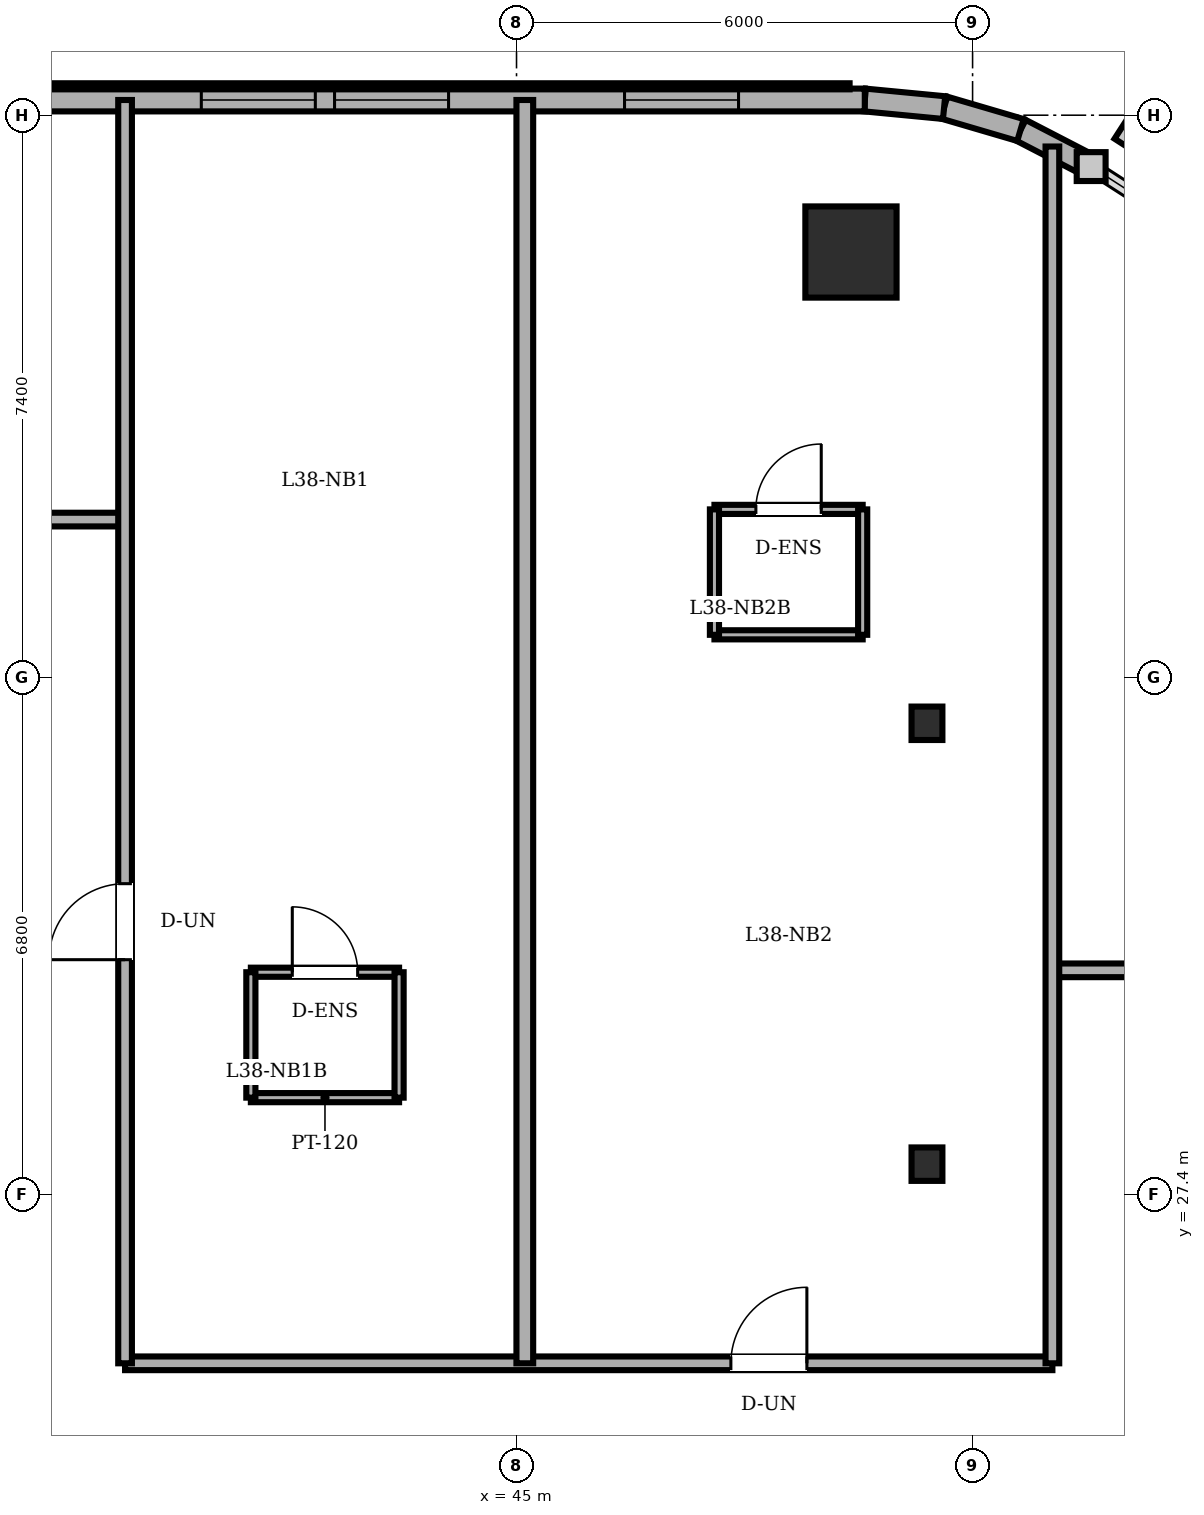
"""IFC4 building model, lengths in metres.
Left out: names, types, materials, properties, quantities, classifications, styles, units other than length and angle.
Written with IfcOpenShell. Run it as: python <this file> out.ifc"""

import sys

from ifc_helpers import new_model, si_unit, direction, frame, frame_2d, origin, origin_2d, place, context, subcontext, project, spatial, rectangle, circle, i_section, extrude, element, fill, save


model = new_model("IFC4")
c1 = context("Model", 3, precision=1e-05, world=origin(), true_north=direction((0.0, 1.0)))
c2 = subcontext(c1, "Body", "Model", "MODEL_VIEW")
j1 = project(units=[si_unit("LENGTHUNIT", "METRE"), si_unit("PLANEANGLEUNIT", "RADIAN")], contexts=[c1])
p1 = place(None, origin())
s1 = spatial("IfcSite", under=j1, at=p1, CompositionType="ELEMENT")
p2 = place(p1, origin())
s2 = spatial("IfcBuilding", under=s1, at=p2, CompositionType="ELEMENT")
p3 = place(p2, frame((0.0, 0.0, 147.4)))
s3 = spatial("IfcBuildingStorey", under=s2, at=p3, CompositionType="ELEMENT", Elevation=147.4)
p4 = place(p3, frame((49.4, 39.8, 0.0), z_axis=(0.0, 0.0, 1.0), x_axis=(1.0, 0.0, 0.0)))
e1 = element("IfcColumn", 1, at=p4, inside=s3, PredefinedType="COLUMN", context=c2, shape_type="SweptSolid", body=[
    extrude(circle(Radius=0.6, at=origin_2d()), origin(), (0.0, 0.0, 1.0), 3.6),
])
for number, where, z_axis, x_axis in (
    (2, (50.4, 27.8, 0.0), (0.0, 0.0, 1.0), (1.0, 0.0, 0.0)),
    (3, (50.4, 33.6, 0.0), (0.0, 0.0, 1.0), (1.0, 0.0, 0.0)),
):
    element("IfcColumn", number, at=place(p3, frame(where, z_axis=z_axis, x_axis=x_axis)), inside=s3, PredefinedType="COLUMN", context=c2, shape_type="SweptSolid", body=[
        extrude(i_section(OverallWidth=0.406, OverallDepth=0.44, WebThickness=0.024, FlangeThickness=0.039, FilletRadius=0.015, at=origin_2d()), origin(), (0.0, 0.0, 1.0), 3.6),
    ])
p5 = place(p3, frame((52.56, 40.924, 0.0), z_axis=(0.0, 0.0, 1.0), x_axis=(-0.888283247196, 0.459296062198, 0.0)))
e4 = element("IfcWall", 4, at=p5, inside=s3, PredefinedType="SOLIDWALL", context=c2, shape_type="SweptSolid", body=[
    extrude(rectangle(XDim=1.047, YDim=0.3, at=frame_2d((0.523, 0.0))), origin(), (0.0, 0.0, 1.0), 3.4),
])
p6 = place(p3, frame((51.63, 41.405, 0.0), z_axis=(0.0, 0.0, 1.0), x_axis=(-0.959528674476, 0.281610942363, 0.0)))
e5 = element("IfcWall", 5, at=p6, inside=s3, PredefinedType="SOLIDWALL", context=c2, shape_type="SweptSolid", body=[
    extrude(rectangle(XDim=1.047, YDim=0.3, at=frame_2d((0.524, 0.0))), origin(), (0.0, 0.0, 1.0), 3.4),
])
p7 = place(p3, frame((50.625, 41.7, 0.0), z_axis=(0.0, 0.0, 1.0), x_axis=(-0.995426089968, 0.095534807324, 0.0)))
e6 = element("IfcWall", 6, at=p7, inside=s3, PredefinedType="SOLIDWALL", context=c2, shape_type="SweptSolid", body=[
    extrude(rectangle(XDim=1.048, YDim=0.3, at=frame_2d((0.524, 0.0))), origin(), (0.0, 0.0, 1.0), 3.4),
])
p8 = place(p3, frame((49.582, 41.8, 0.0), z_axis=(0.0, 0.0, 1.0), x_axis=(-1.0, 0.0, 0.0)))
e7 = element("IfcWall", 7, at=p8, inside=s3, PredefinedType="SOLIDWALL", context=c2, shape_type="SweptSolid", body=[
    extrude(rectangle(XDim=30.282, YDim=0.3, at=frame_2d((15.141, 0.0))), origin(), (0.0, 0.0, 1.0), 3.4),
])
p9 = place(p8, frame((25.707, 0.0, 0.0)))
e8 = element("IfcOpeningElement", 8, at=p9, cuts=e7, PredefinedType="OPENING", context=c2, shape_type="SweptSolid", body=[
    extrude(rectangle(XDim=0.95, YDim=2.2, at=frame_2d((0.475, 1.1))), frame((0.0, 0.16, 0.0), z_axis=(0.0, -1.0, 0.0), x_axis=(1.0, 0.0, 0.0)), (0.0, 0.0, 1.0), 0.32),
])
p10 = place(p8, frame((1.661, 0.0, 0.85)))
e9 = element("IfcOpeningElement", 9, at=p10, cuts=e7, PredefinedType="OPENING", context=c2, shape_type="SweptSolid", body=[
    extrude(rectangle(XDim=1.5, YDim=1.55, at=frame_2d((0.75, 0.775))), frame((0.0, 0.16, 0.0), z_axis=(0.0, -1.0, 0.0), x_axis=(1.0, 0.0, 0.0)), (0.0, 0.0, 1.0), 0.32),
])
p11 = place(p8, frame((5.476, 0.0, 0.85)))
e10 = element("IfcOpeningElement", 10, at=p11, cuts=e7, PredefinedType="OPENING", context=c2, shape_type="SweptSolid", body=[
    extrude(rectangle(XDim=1.5, YDim=1.55, at=frame_2d((0.75, 0.775))), frame((0.0, 0.16, 0.0), z_axis=(0.0, -1.0, 0.0), x_axis=(1.0, 0.0, 0.0)), (0.0, 0.0, 1.0), 0.32),
])
p12 = place(p8, frame((7.229, 0.0, 0.85)))
e11 = element("IfcOpeningElement", 11, at=p12, cuts=e7, PredefinedType="OPENING", context=c2, shape_type="SweptSolid", body=[
    extrude(rectangle(XDim=1.5, YDim=1.55, at=frame_2d((0.75, 0.775))), frame((0.0, 0.16, 0.0), z_axis=(0.0, -1.0, 0.0), x_axis=(1.0, 0.0, 0.0)), (0.0, 0.0, 1.0), 0.32),
])
p13 = place(p8, frame((11.665, 0.0, 0.85)))
e12 = element("IfcOpeningElement", 12, at=p13, cuts=e7, PredefinedType="OPENING", context=c2, shape_type="SweptSolid", body=[
    extrude(rectangle(XDim=1.5, YDim=1.55, at=frame_2d((0.75, 0.775))), frame((0.0, 0.16, 0.0), z_axis=(0.0, -1.0, 0.0), x_axis=(1.0, 0.0, 0.0)), (0.0, 0.0, 1.0), 0.32),
])
p14 = place(p8, frame((14.349, 0.0, 0.85)))
e13 = element("IfcOpeningElement", 13, at=p14, cuts=e7, PredefinedType="OPENING", context=c2, shape_type="SweptSolid", body=[
    extrude(rectangle(XDim=1.5, YDim=1.55, at=frame_2d((0.75, 0.775))), frame((0.0, 0.16, 0.0), z_axis=(0.0, -1.0, 0.0), x_axis=(1.0, 0.0, 0.0)), (0.0, 0.0, 1.0), 0.32),
])
p15 = place(p8, frame((18.932, 0.0, 0.85)))
e14 = element("IfcOpeningElement", 14, at=p15, cuts=e7, PredefinedType="OPENING", context=c2, shape_type="SweptSolid", body=[
    extrude(rectangle(XDim=1.5, YDim=1.55, at=frame_2d((0.75, 0.775))), frame((0.0, 0.16, 0.0), z_axis=(0.0, -1.0, 0.0), x_axis=(1.0, 0.0, 0.0)), (0.0, 0.0, 1.0), 0.32),
])
p16 = place(p8, frame((22.532, 0.0, 0.85)))
e15 = element("IfcOpeningElement", 15, at=p16, cuts=e7, PredefinedType="OPENING", context=c2, shape_type="SweptSolid", body=[
    extrude(rectangle(XDim=1.5, YDim=1.55, at=frame_2d((0.75, 0.775))), frame((0.0, 0.16, 0.0), z_axis=(0.0, -1.0, 0.0), x_axis=(1.0, 0.0, 0.0)), (0.0, 0.0, 1.0), 0.32),
])
p17 = place(p8, frame((27.532, 0.0, 0.85)))
e16 = element("IfcOpeningElement", 16, at=p17, cuts=e7, PredefinedType="OPENING", context=c2, shape_type="SweptSolid", body=[
    extrude(rectangle(XDim=1.5, YDim=1.55, at=frame_2d((0.75, 0.775))), frame((0.0, 0.16, 0.0), z_axis=(0.0, -1.0, 0.0), x_axis=(1.0, 0.0, 0.0)), (0.0, 0.0, 1.0), 0.32),
])
p18 = place(p3, frame((41.505, 30.325, 0.0), z_axis=(0.0, 0.0, 1.0), x_axis=(1.0, 0.0, 0.0)))
e17 = element("IfcWall", 17, at=p18, inside=s3, PredefinedType="PARTITIONING", context=c2, shape_type="SweptSolid", body=[
    extrude(rectangle(XDim=1.95, YDim=0.12, at=frame_2d((0.975, 0.0))), origin(), (0.0, 0.0, 1.0), 3.4),
])
p19 = place(p18, frame((0.545, 0.0, 0.0)))
e18 = element("IfcOpeningElement", 18, at=p19, cuts=e17, PredefinedType="OPENING", context=c2, shape_type="SweptSolid", body=[
    extrude(rectangle(XDim=0.86, YDim=2.1, at=frame_2d((0.43, 1.05))), frame((0.0, 0.07, 0.0), z_axis=(0.0, -1.0, 0.0), x_axis=(1.0, 0.0, 0.0)), (0.0, 0.0, 1.0), 0.14),
])
p20 = place(p3, frame((43.455, 28.675, 0.0), z_axis=(0.0, 0.0, 1.0), x_axis=(-1.0, 0.0, 0.0)))
e19 = element("IfcWall", 19, at=p20, inside=s3, PredefinedType="PARTITIONING", context=c2, shape_type="SweptSolid", body=[
    extrude(rectangle(XDim=1.95, YDim=0.12, at=frame_2d((0.975, 0.0))), origin(), (0.0, 0.0, 1.0), 3.4),
])
for number, where, z_axis, x_axis in (
    (20, (41.505, 30.325, 0.0), (0.0, 0.0, 1.0), (0.0, -1.0, 0.0)),
    (21, (43.455, 28.675, 0.0), (0.0, 0.0, 1.0), (0.0, 1.0, 0.0)),
):
    element("IfcWall", number, at=place(p3, frame(where, z_axis=z_axis, x_axis=x_axis)), inside=s3, PredefinedType="PARTITIONING", context=c2, shape_type="SweptSolid", body=[
        extrude(rectangle(XDim=1.65, YDim=0.12, at=frame_2d((0.825, 0.0))), origin(), (0.0, 0.0, 1.0), 3.4),
    ])
p21 = place(p3, frame((47.604, 36.414, 0.0), z_axis=(0.0, 0.0, 1.0), x_axis=(1.0, 0.0, 0.0)))
e22 = element("IfcWall", 22, at=p21, inside=s3, PredefinedType="PARTITIONING", context=c2, shape_type="SweptSolid", body=[
    extrude(rectangle(XDim=1.95, YDim=0.12, at=frame_2d((0.975, 0.0))), origin(), (0.0, 0.0, 1.0), 3.4),
])
p22 = place(p21, frame((0.545, 0.0, 0.0)))
e23 = element("IfcOpeningElement", 23, at=p22, cuts=e22, PredefinedType="OPENING", context=c2, shape_type="SweptSolid", body=[
    extrude(rectangle(XDim=0.86, YDim=2.1, at=frame_2d((0.43, 1.05))), frame((0.0, 0.07, 0.0), z_axis=(0.0, -1.0, 0.0), x_axis=(1.0, 0.0, 0.0)), (0.0, 0.0, 1.0), 0.14),
])
p23 = place(p3, frame((49.554, 34.764, 0.0), z_axis=(0.0, 0.0, 1.0), x_axis=(-1.0, 0.0, 0.0)))
e24 = element("IfcWall", 24, at=p23, inside=s3, PredefinedType="PARTITIONING", context=c2, shape_type="SweptSolid", body=[
    extrude(rectangle(XDim=1.95, YDim=0.12, at=frame_2d((0.975, 0.0))), origin(), (0.0, 0.0, 1.0), 3.4),
])
for number, where, z_axis, x_axis in (
    (25, (47.604, 36.414, 0.0), (0.0, 0.0, 1.0), (0.0, -1.0, 0.0)),
    (26, (49.554, 34.764, 0.0), (0.0, 0.0, 1.0), (0.0, 1.0, 0.0)),
):
    element("IfcWall", number, at=place(p3, frame(where, z_axis=z_axis, x_axis=x_axis)), inside=s3, PredefinedType="PARTITIONING", context=c2, shape_type="SweptSolid", body=[
        extrude(rectangle(XDim=1.65, YDim=0.12, at=frame_2d((0.825, 0.0))), origin(), (0.0, 0.0, 1.0), 3.4),
    ])
p24 = place(p3, frame((39.85, 25.18, 0.0), z_axis=(0.0, 0.0, 1.0), x_axis=(1.0, 0.0, 0.0)))
e27 = element("IfcWall", 27, at=p24, inside=s3, PredefinedType="PARTITIONING", context=c2, shape_type="SweptSolid", body=[
    extrude(rectangle(XDim=12.2, YDim=0.18, at=frame_2d((6.1, 0.0))), origin(), (0.0, 0.0, 1.0), 3.4),
])
p25 = place(p24, frame((7.97, 0.0, 0.0)))
e28 = element("IfcOpeningElement", 28, at=p25, cuts=e27, PredefinedType="OPENING", context=c2, shape_type="SweptSolid", body=[
    extrude(rectangle(XDim=1.0, YDim=2.15, at=frame_2d((0.5, 1.075))), frame((0.0, 0.1, 0.0), z_axis=(0.0, -1.0, 0.0), x_axis=(1.0, 0.0, 0.0)), (0.0, 0.0, 1.0), 0.2),
])
p26 = place(p3, frame((52.05, 30.35, 0.0), z_axis=(0.0, 0.0, 1.0), x_axis=(1.0, 0.0, 0.0)))
e29 = element("IfcWall", 29, at=p26, inside=s3, PredefinedType="PARTITIONING", context=c2, shape_type="SweptSolid", body=[
    extrude(rectangle(XDim=10.95, YDim=0.18, at=frame_2d((5.475, 0.0))), origin(), (0.0, 0.0, 1.0), 3.4),
])
p27 = place(p26, frame((0.975, 0.0, 0.0)))
e30 = element("IfcOpeningElement", 30, at=p27, cuts=e29, PredefinedType="OPENING", context=c2, shape_type="SweptSolid", body=[
    extrude(rectangle(XDim=0.92, YDim=2.1, at=frame_2d((0.46, 1.05))), frame((0.0, 0.1, 0.0), z_axis=(0.0, -1.0, 0.0), x_axis=(1.0, 0.0, 0.0)), (0.0, 0.0, 1.0), 0.2),
])
p28 = place(p3, frame((13.8, 36.28, 0.0), z_axis=(0.0, 0.0, 1.0), x_axis=(1.0, 0.0, 0.0)))
e31 = element("IfcWall", 31, at=p28, inside=s3, PredefinedType="PARTITIONING", context=c2, shape_type="SweptSolid", body=[
    extrude(rectangle(XDim=26.05, YDim=0.18, at=frame_2d((13.025, 0.0))), origin(), (0.0, 0.0, 1.0), 3.4),
])
p29 = place(p28, frame((12.05, 0.0, 0.0)))
e32 = element("IfcOpeningElement", 32, at=p29, cuts=e31, PredefinedType="OPENING", context=c2, shape_type="SweptSolid", body=[
    extrude(rectangle(XDim=0.9, YDim=2.1, at=frame_2d((0.45, 1.05))), frame((0.0, 0.1, 0.0), z_axis=(0.0, -1.0, 0.0), x_axis=(1.0, 0.0, 0.0)), (0.0, 0.0, 1.0), 0.2),
])
p30 = place(p28, frame((15.67, 0.0, 0.0)))
e33 = element("IfcOpeningElement", 33, at=p30, cuts=e31, PredefinedType="OPENING", context=c2, shape_type="SweptSolid", body=[
    extrude(rectangle(XDim=0.86, YDim=2.1, at=frame_2d((0.43, 1.05))), frame((0.0, 0.1, 0.0), z_axis=(0.0, -1.0, 0.0), x_axis=(1.0, 0.0, 0.0)), (0.0, 0.0, 1.0), 0.2),
])
p31 = place(p28, frame((5.54, 0.0, 0.0)))
e34 = element("IfcOpeningElement", 34, at=p31, cuts=e31, PredefinedType="OPENING", context=c2, shape_type="SweptSolid", body=[
    extrude(rectangle(XDim=0.92, YDim=2.1, at=frame_2d((0.46, 1.05))), frame((0.0, 0.1, 0.0), z_axis=(0.0, -1.0, 0.0), x_axis=(1.0, 0.0, 0.0)), (0.0, 0.0, 1.0), 0.2),
])
p32 = place(p28, frame((21.305, 0.0, 0.0)))
e35 = element("IfcOpeningElement", 35, at=p32, cuts=e31, PredefinedType="OPENING", context=c2, shape_type="SweptSolid", body=[
    extrude(rectangle(XDim=0.92, YDim=2.1, at=frame_2d((0.46, 1.05))), frame((0.0, 0.1, 0.0), z_axis=(0.0, -1.0, 0.0), x_axis=(1.0, 0.0, 0.0)), (0.0, 0.0, 1.0), 0.2),
])
p33 = place(p3, frame((39.85, 25.18, 0.0), z_axis=(0.0, 0.0, 1.0), x_axis=(0.0, 1.0, 0.0)))
e36 = element("IfcWall", 36, at=p33, inside=s3, PredefinedType="PARTITIONING", context=c2, shape_type="SweptSolid", body=[
    extrude(rectangle(XDim=16.62, YDim=0.18, at=frame_2d((8.31, 0.0))), origin(), (0.0, 0.0, 1.0), 3.4),
])
p34 = place(p33, frame((5.31, 0.0, 0.0)))
e37 = element("IfcOpeningElement", 37, at=p34, cuts=e36, PredefinedType="OPENING", context=c2, shape_type="SweptSolid", body=[
    extrude(rectangle(XDim=1.0, YDim=2.15, at=frame_2d((0.5, 1.075))), frame((0.0, 0.1, 0.0), z_axis=(0.0, -1.0, 0.0), x_axis=(1.0, 0.0, 0.0)), (0.0, 0.0, 1.0), 0.2),
])
p35 = place(p3, frame((45.109, 25.18, 0.0), z_axis=(0.0, 0.0, 1.0), x_axis=(0.0, 1.0, 0.0)))
e38 = element("IfcWall", 38, at=p35, inside=s3, PredefinedType="PARTITIONING", context=c2, shape_type="SweptSolid", body=[
    extrude(rectangle(XDim=16.62, YDim=0.22, at=frame_2d((8.31, 0.0))), origin(), (0.0, 0.0, 1.0), 3.4),
])
p36 = place(p3, frame((52.05, 25.18, 0.0), z_axis=(0.0, 0.0, 1.0), x_axis=(0.0, 1.0, 0.0)))
e39 = element("IfcWall", 39, at=p36, inside=s3, PredefinedType="PARTITIONING", context=c2, shape_type="SweptSolid", body=[
    extrude(rectangle(XDim=16.008, YDim=0.18, at=frame_2d((8.004, 0.0))), origin(), (0.0, 0.0, 1.0), 3.4),
])
p37 = place(p10, origin())
e40 = element("IfcWindow", 40, at=p37, inside=s3, PartitioningType="DOUBLE_PANEL_VERTICAL", PredefinedType="WINDOW", context=c2, shape_type="SweptSolid", body=[
    extrude(rectangle(XDim=1.5, YDim=1.55, at=frame_2d((0.75, 0.775))), frame((0.0, 0.03, 0.0), z_axis=(0.0, -1.0, 0.0), x_axis=(1.0, 0.0, 0.0)), (0.0, 0.0, 1.0), 0.06),
])
fill(e9, e40)
p38 = place(p11, origin())
e41 = element("IfcWindow", 41, at=p38, inside=s3, PartitioningType="DOUBLE_PANEL_VERTICAL", PredefinedType="WINDOW", context=c2, shape_type="SweptSolid", body=[
    extrude(rectangle(XDim=1.5, YDim=1.55, at=frame_2d((0.75, 0.775))), frame((0.0, 0.03, 0.0), z_axis=(0.0, -1.0, 0.0), x_axis=(1.0, 0.0, 0.0)), (0.0, 0.0, 1.0), 0.06),
])
fill(e10, e41)
p39 = place(p12, origin())
e42 = element("IfcWindow", 42, at=p39, inside=s3, PartitioningType="DOUBLE_PANEL_VERTICAL", PredefinedType="WINDOW", context=c2, shape_type="SweptSolid", body=[
    extrude(rectangle(XDim=1.5, YDim=1.55, at=frame_2d((0.75, 0.775))), frame((0.0, 0.03, 0.0), z_axis=(0.0, -1.0, 0.0), x_axis=(1.0, 0.0, 0.0)), (0.0, 0.0, 1.0), 0.06),
])
fill(e11, e42)
p40 = place(p19, origin())
e43 = element("IfcDoor", 43, at=p40, inside=s3, OperationType="SINGLE_SWING_LEFT", PredefinedType="DOOR", context=c2, shape_type="SweptSolid", body=[
    extrude(rectangle(XDim=0.86, YDim=2.1, at=frame_2d((0.43, 1.05))), frame((0.0, 0.025, 0.0), z_axis=(0.0, -1.0, 0.0), x_axis=(1.0, 0.0, 0.0)), (0.0, 0.0, 1.0), 0.05),
])
fill(e18, e43)
p41 = place(p22, origin())
e44 = element("IfcDoor", 44, at=p41, inside=s3, OperationType="SINGLE_SWING_RIGHT", PredefinedType="DOOR", context=c2, shape_type="SweptSolid", body=[
    extrude(rectangle(XDim=0.86, YDim=2.1, at=frame_2d((0.43, 1.05))), frame((0.0, 0.025, 0.0), z_axis=(0.0, -1.0, 0.0), x_axis=(1.0, 0.0, 0.0)), (0.0, 0.0, 1.0), 0.05),
])
fill(e23, e44)
p42 = place(p34, origin())
e45 = element("IfcDoor", 45, at=p42, inside=s3, OperationType="SINGLE_SWING_LEFT", PredefinedType="DOOR", context=c2, shape_type="SweptSolid", body=[
    extrude(rectangle(XDim=1.0, YDim=2.15, at=frame_2d((0.5, 1.075))), frame((0.0, 0.025, 0.0), z_axis=(0.0, -1.0, 0.0), x_axis=(1.0, 0.0, 0.0)), (0.0, 0.0, 1.0), 0.05),
])
fill(e37, e45)
p43 = place(p25, origin())
e46 = element("IfcDoor", 46, at=p43, inside=s3, OperationType="SINGLE_SWING_RIGHT", PredefinedType="DOOR", context=c2, shape_type="SweptSolid", body=[
    extrude(rectangle(XDim=1.0, YDim=2.15, at=frame_2d((0.5, 1.075))), frame((0.0, 0.025, 0.0), z_axis=(0.0, -1.0, 0.0), x_axis=(1.0, 0.0, 0.0)), (0.0, 0.0, 1.0), 0.05),
])
fill(e28, e46)
save(model, sys.argv[1])
